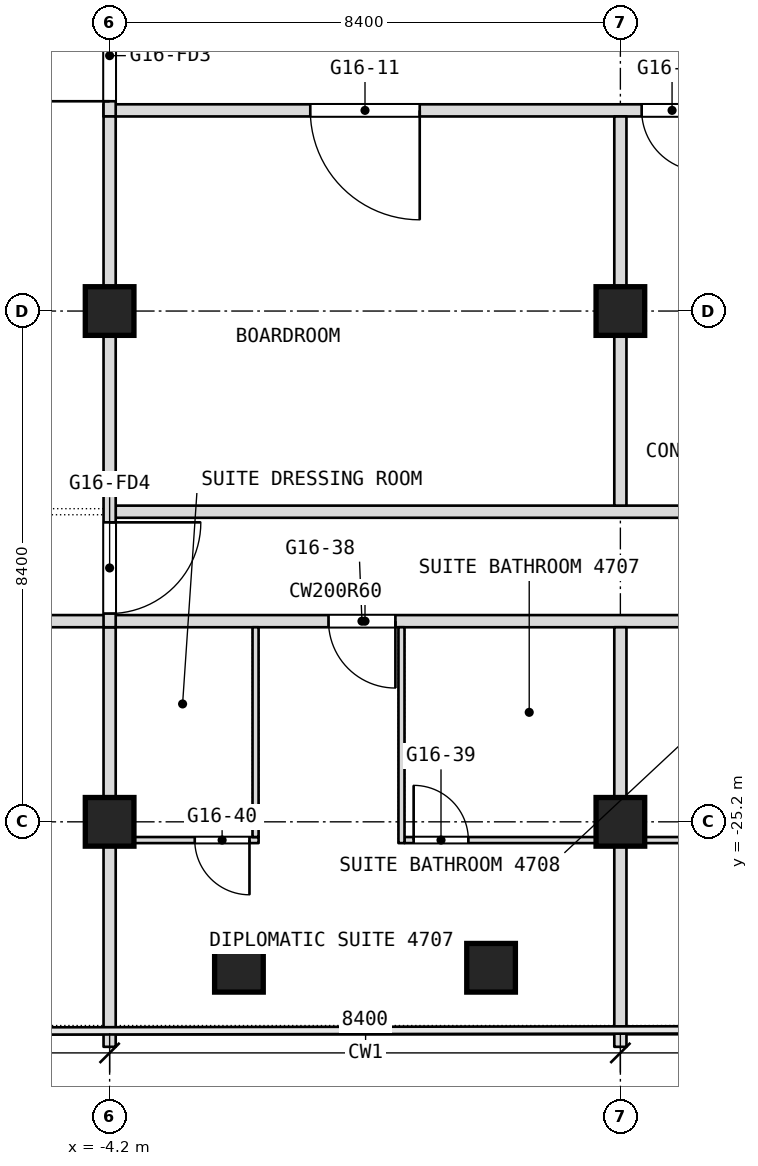
"""IFC4 building model, lengths in metres.
Left out: names, types, materials, properties, quantities, classifications, styles, units other than length and angle.
Written with IfcOpenShell. Run it as: python <this file> out.ifc"""

import sys

from ifc_helpers import new_model, si_unit, direction, frame, frame_2d, origin, origin_2d, place, context, subcontext, project, spatial, rectangle, extrude, element, fill, save


model = new_model("IFC4")
c1 = context("Model", 3, precision=1e-05, world=origin(), true_north=direction((0.0, 1.0)))
c2 = subcontext(c1, "Body", "Model", "MODEL_VIEW")
j1 = project(units=[si_unit("LENGTHUNIT", "METRE"), si_unit("PLANEANGLEUNIT", "RADIAN")], contexts=[c1])
p1 = place(None, origin())
s1 = spatial("IfcSite", under=j1, at=p1, CompositionType="ELEMENT")
p2 = place(p1, origin())
s2 = spatial("IfcBuilding", under=s1, at=p2, CompositionType="ELEMENT")
p3 = place(p2, frame((0.0, 0.0, 205.7)))
s3 = spatial("IfcBuildingStorey", under=s2, at=p3, CompositionType="ELEMENT", Elevation=205.7)
for number, where, z_axis, x_axis in (
    (1, (-4.2, -25.2, 0.0), (0.0, 0.0, 1.0), (1.0, 0.0, 0.0)),
    (2, (-4.2, -16.8, 0.0), (0.0, 0.0, 1.0), (1.0, 0.0, 0.0)),
    (3, (4.2, -25.2, 0.0), (0.0, 0.0, 1.0), (1.0, 0.0, 0.0)),
    (4, (4.2, -16.8, 0.0), (0.0, 0.0, 1.0), (1.0, 0.0, 0.0)),
    (5, (2.073, -27.6, 0.0), (0.0, 0.0, 1.0), (1.0, 0.0, 0.0)),
    (6, (-2.073, -27.6, 0.0), (0.0, 0.0, 1.0), (1.0, 0.0, 0.0)),
):
    element("IfcColumn", number, at=place(p3, frame(where, z_axis=z_axis, x_axis=x_axis)), inside=s3, PredefinedType="COLUMN", context=c2, shape_type="SweptSolid", body=[
        extrude(rectangle(XDim=0.8, YDim=0.8, at=origin_2d()), origin(), (0.0, 0.0, 1.0), 3.6),
    ])
p4 = place(p3, frame((-4.1, -25.5, 0.0), z_axis=(0.0, 0.0, 1.0), x_axis=(1.0, 0.0, 0.0)))
e7 = element("IfcWall", 7, at=p4, inside=s3, PredefinedType="PARTITIONING", context=c2, shape_type="SweptSolid", body=[
    extrude(rectangle(XDim=2.35, YDim=0.1, at=frame_2d((1.175, 0.0))), origin(), (0.0, 0.0, 1.0), 3.34),
])
p5 = place(p4, frame((1.3, 0.0, 0.0)))
e8 = element("IfcOpeningElement", 8, at=p5, cuts=e7, PredefinedType="OPENING", context=c2, shape_type="SweptSolid", body=[
    extrude(rectangle(XDim=0.9, YDim=2.1, at=frame_2d((0.45, 1.05))), frame((0.0, 0.05, 0.0), z_axis=(0.0, -1.0, 0.0), x_axis=(1.0, 0.0, 0.0)), (0.0, 0.0, 1.0), 0.1),
])
p6 = place(p3, frame((0.65, -25.5, 0.0), z_axis=(0.0, 0.0, 1.0), x_axis=(1.0, 0.0, 0.0)))
e9 = element("IfcWall", 9, at=p6, inside=s3, PredefinedType="PARTITIONING", context=c2, shape_type="SweptSolid", body=[
    extrude(rectangle(XDim=7.2, YDim=0.1, at=frame_2d((3.6, 0.0))), origin(), (0.0, 0.0, 1.0), 3.34),
])
p7 = place(p6, frame((0.15, 0.0, 0.0)))
e10 = element("IfcOpeningElement", 10, at=p7, cuts=e9, PredefinedType="OPENING", context=c2, shape_type="SweptSolid", body=[
    extrude(rectangle(XDim=0.9, YDim=2.1, at=frame_2d((0.45, 1.05))), frame((0.0, 0.05, 0.0), z_axis=(0.0, -1.0, 0.0), x_axis=(1.0, 0.0, 0.0)), (0.0, 0.0, 1.0), 0.1),
])
p8 = place(p6, frame((6.15, 0.0, 0.0)))
e11 = element("IfcOpeningElement", 11, at=p8, cuts=e9, PredefinedType="OPENING", context=c2, shape_type="SweptSolid", body=[
    extrude(rectangle(XDim=0.9, YDim=2.1, at=frame_2d((0.45, 1.05))), frame((0.0, 0.05, 0.0), z_axis=(0.0, -1.0, 0.0), x_axis=(1.0, 0.0, 0.0)), (0.0, 0.0, 1.0), 0.1),
])
p9 = place(p3, frame((-16.7, -21.9, 0.0), z_axis=(0.0, 0.0, 1.0), x_axis=(1.0, 0.0, 0.0)))
e12 = element("IfcWall", 12, at=p9, inside=s3, PredefinedType="PARTITIONING", context=c2, shape_type="SweptSolid", body=[
    extrude(rectangle(XDim=33.4, YDim=0.2, at=frame_2d((16.7, 0.0))), origin(), (0.0, 0.0, 1.0), 3.34),
])
p10 = place(p9, frame((0.3, 0.0, 0.0)))
e13 = element("IfcOpeningElement", 13, at=p10, cuts=e12, PredefinedType="OPENING", context=c2, shape_type="SweptSolid", body=[
    extrude(rectangle(XDim=1.0, YDim=2.1, at=frame_2d((0.5, 1.05))), frame((0.0, 0.1, 0.0), z_axis=(0.0, -1.0, 0.0), x_axis=(1.0, 0.0, 0.0)), (0.0, 0.0, 1.0), 0.2),
])
p11 = place(p9, frame((9.85, 0.0, 0.0)))
e14 = element("IfcOpeningElement", 14, at=p11, cuts=e12, PredefinedType="OPENING", context=c2, shape_type="SweptSolid", body=[
    extrude(rectangle(XDim=1.1, YDim=2.1, at=frame_2d((0.55, 1.05))), frame((0.0, 0.1, 0.0), z_axis=(0.0, -1.0, 0.0), x_axis=(1.0, 0.0, 0.0)), (0.0, 0.0, 1.0), 0.2),
])
p12 = place(p9, frame((16.1, 0.0, 0.0)))
e15 = element("IfcOpeningElement", 15, at=p12, cuts=e12, PredefinedType="OPENING", context=c2, shape_type="SweptSolid", body=[
    extrude(rectangle(XDim=1.1, YDim=2.1, at=frame_2d((0.55, 1.05))), frame((0.0, 0.1, 0.0), z_axis=(0.0, -1.0, 0.0), x_axis=(1.0, 0.0, 0.0)), (0.0, 0.0, 1.0), 0.2),
])
p13 = place(p9, frame((24.6, 0.0, 0.0)))
e16 = element("IfcOpeningElement", 16, at=p13, cuts=e12, PredefinedType="OPENING", context=c2, shape_type="SweptSolid", body=[
    extrude(rectangle(XDim=1.1, YDim=2.1, at=frame_2d((0.55, 1.05))), frame((0.0, 0.1, 0.0), z_axis=(0.0, -1.0, 0.0), x_axis=(1.0, 0.0, 0.0)), (0.0, 0.0, 1.0), 0.2),
])
p14 = place(p9, frame((29.7, 0.0, 0.0)))
e17 = element("IfcOpeningElement", 17, at=p14, cuts=e12, PredefinedType="OPENING", context=c2, shape_type="SweptSolid", body=[
    extrude(rectangle(XDim=1.0, YDim=2.1, at=frame_2d((0.5, 1.05))), frame((0.0, 0.1, 0.0), z_axis=(0.0, -1.0, 0.0), x_axis=(1.0, 0.0, 0.0)), (0.0, 0.0, 1.0), 0.2),
])
p15 = place(p3, frame((-4.1, -20.1, 0.0), z_axis=(0.0, 0.0, 1.0), x_axis=(1.0, 0.0, 0.0)))
e18 = element("IfcWall", 18, at=p15, inside=s3, PredefinedType="PARTITIONING", context=c2, shape_type="SweptSolid", body=[
    extrude(rectangle(XDim=20.8, YDim=0.2, at=frame_2d((10.4, 0.0))), origin(), (0.0, 0.0, 1.0), 3.34),
])
p16 = place(p3, frame((-4.3, -13.5, 0.0), z_axis=(0.0, 0.0, 1.0), x_axis=(1.0, 0.0, 0.0)))
e19 = element("IfcWall", 19, at=p16, inside=s3, PredefinedType="PARTITIONING", context=c2, shape_type="SweptSolid", body=[
    extrude(rectangle(XDim=10.0, YDim=0.2, at=frame_2d((5.0, 0.0))), origin(), (0.0, 0.0, 1.0), 3.34),
])
p17 = place(p16, frame((3.4, 0.0, 0.0)))
e20 = element("IfcOpeningElement", 20, at=p17, cuts=e19, PredefinedType="OPENING", context=c2, shape_type="SweptSolid", body=[
    extrude(rectangle(XDim=1.8, YDim=2.1, at=frame_2d((0.9, 1.05))), frame((0.0, 0.1, 0.0), z_axis=(0.0, -1.0, 0.0), x_axis=(1.0, 0.0, 0.0)), (0.0, 0.0, 1.0), 0.2),
])
p18 = place(p16, frame((8.85, 0.0, 0.0)))
e21 = element("IfcOpeningElement", 21, at=p18, cuts=e19, PredefinedType="OPENING", context=c2, shape_type="SweptSolid", body=[
    extrude(rectangle(XDim=1.0, YDim=2.1, at=frame_2d((0.5, 1.05))), frame((0.0, 0.1, 0.0), z_axis=(0.0, -1.0, 0.0), x_axis=(1.0, 0.0, 0.0)), (0.0, 0.0, 1.0), 0.2),
])
p19 = place(p3, frame((4.2, -28.9, 0.0), z_axis=(0.0, 0.0, 1.0), x_axis=(0.0, 1.0, 0.0)))
e22 = element("IfcWall", 22, at=p19, inside=s3, PredefinedType="PARTITIONING", context=c2, shape_type="SweptSolid", body=[
    extrude(rectangle(XDim=6.9, YDim=0.2, at=frame_2d((3.45, 0.0))), origin(), (0.0, 0.0, 1.0), 3.34),
])
p20 = place(p3, frame((4.2, -20.0, 0.0), z_axis=(0.0, 0.0, 1.0), x_axis=(0.0, 1.0, 0.0)))
e23 = element("IfcWall", 23, at=p20, inside=s3, PredefinedType="PARTITIONING", context=c2, shape_type="SweptSolid", body=[
    extrude(rectangle(XDim=6.4, YDim=0.2, at=frame_2d((3.2, 0.0))), origin(), (0.0, 0.0, 1.0), 3.34),
])
p21 = place(p3, frame((0.6, -25.55, 0.0), z_axis=(0.0, 0.0, 1.0), x_axis=(0.0, 1.0, 0.0)))
e24 = element("IfcWall", 24, at=p21, inside=s3, PredefinedType="PARTITIONING", context=c2, shape_type="SweptSolid", body=[
    extrude(rectangle(XDim=3.55, YDim=0.1, at=frame_2d((1.775, 0.0))), origin(), (0.0, 0.0, 1.0), 3.34),
])
p22 = place(p3, frame((-1.8, -25.45, 0.0), z_axis=(0.0, 0.0, 1.0), x_axis=(0.0, 1.0, 0.0)))
e25 = element("IfcWall", 25, at=p22, inside=s3, PredefinedType="PARTITIONING", context=c2, shape_type="SweptSolid", body=[
    extrude(rectangle(XDim=3.45, YDim=0.1, at=frame_2d((1.725, 0.0))), origin(), (0.0, 0.0, 1.0), 3.34),
])
p23 = place(p3, frame((-4.2, -28.9, 0.0), z_axis=(0.0, 0.0, 1.0), x_axis=(0.0, 1.0, 0.0)))
e26 = element("IfcWall", 26, at=p23, inside=s3, PredefinedType="PARTITIONING", context=c2, shape_type="SweptSolid", body=[
    extrude(rectangle(XDim=6.9, YDim=0.2, at=frame_2d((3.45, 0.0))), origin(), (0.0, 0.0, 1.0), 3.34),
])
p24 = place(p3, frame((-4.2, -13.6, 0.0), z_axis=(0.0, 0.0, 1.0), x_axis=(0.0, 1.0, 0.0)))
e27 = element("IfcWall", 27, at=p24, inside=s3, PredefinedType="PARTITIONING", context=c2, shape_type="SweptSolid", body=[
    extrude(rectangle(XDim=13.6, YDim=0.2, at=frame_2d((6.8, 0.0))), origin(), (0.0, 0.0, 1.0), 3.34),
])
p25 = place(p24, frame((11.95, 0.0, 0.0)))
e28 = element("IfcOpeningElement", 28, at=p25, cuts=e27, PredefinedType="OPENING", context=c2, shape_type="SweptSolid", body=[
    extrude(rectangle(XDim=1.5, YDim=2.1, at=frame_2d((0.75, 1.05))), frame((0.0, 0.1, 0.0), z_axis=(0.0, -1.0, 0.0), x_axis=(1.0, 0.0, 0.0)), (0.0, 0.0, 1.0), 0.2),
])
p26 = place(p24, frame((0.25, 0.0, 0.0)))
e29 = element("IfcOpeningElement", 29, at=p26, cuts=e27, PredefinedType="OPENING", context=c2, shape_type="SweptSolid", body=[
    extrude(rectangle(XDim=1.5, YDim=2.1, at=frame_2d((0.75, 1.05))), frame((0.0, 0.1, 0.0), z_axis=(0.0, -1.0, 0.0), x_axis=(1.0, 0.0, 0.0)), (0.0, 0.0, 1.0), 0.2),
])
p27 = place(p3, frame((-4.2, -22.0, 0.0), z_axis=(0.0, 0.0, 1.0), x_axis=(0.0, 1.0, 0.0)))
e30 = element("IfcWall", 30, at=p27, inside=s3, PredefinedType="PARTITIONING", context=c2, shape_type="SweptSolid", body=[
    extrude(rectangle(XDim=8.4, YDim=0.2, at=frame_2d((4.2, 0.0))), origin(), (0.0, 0.0, 1.0), 3.34),
])
p28 = place(p27, frame((0.225, 0.0, 0.0)))
e31 = element("IfcOpeningElement", 31, at=p28, cuts=e30, PredefinedType="OPENING", context=c2, shape_type="SweptSolid", body=[
    extrude(rectangle(XDim=1.5, YDim=2.1, at=frame_2d((0.75, 1.05))), frame((0.0, 0.1, 0.0), z_axis=(0.0, -1.0, 0.0), x_axis=(1.0, 0.0, 0.0)), (0.0, 0.0, 1.0), 0.2),
])
p29 = place(p5, origin())
e32 = element("IfcDoor", 32, at=p29, inside=s3, OperationType="SINGLE_SWING_RIGHT", PredefinedType="DOOR", context=c2, shape_type="SweptSolid", body=[
    extrude(rectangle(XDim=0.9, YDim=2.1, at=frame_2d((0.45, 1.05))), frame((0.0, 0.025, 0.0), z_axis=(0.0, -1.0, 0.0), x_axis=(1.0, 0.0, 0.0)), (0.0, 0.0, 1.0), 0.05),
])
fill(e8, e32)
p30 = place(p7, origin())
e33 = element("IfcDoor", 33, at=p30, inside=s3, OperationType="SINGLE_SWING_LEFT", PredefinedType="DOOR", context=c2, shape_type="SweptSolid", body=[
    extrude(rectangle(XDim=0.9, YDim=2.1, at=frame_2d((0.45, 1.05))), frame((0.0, 0.025, 0.0), z_axis=(0.0, -1.0, 0.0), x_axis=(1.0, 0.0, 0.0)), (0.0, 0.0, 1.0), 0.05),
])
fill(e10, e33)
p31 = place(p12, origin())
e34 = element("IfcDoor", 34, at=p31, inside=s3, OperationType="SINGLE_SWING_LEFT", PredefinedType="DOOR", context=c2, shape_type="SweptSolid", body=[
    extrude(rectangle(XDim=1.1, YDim=2.1, at=frame_2d((0.55, 1.05))), frame((0.0, 0.025, 0.0), z_axis=(0.0, -1.0, 0.0), x_axis=(1.0, 0.0, 0.0)), (0.0, 0.0, 1.0), 0.05),
])
fill(e15, e34)
p32 = place(p17, origin())
e35 = element("IfcDoor", 35, at=p32, inside=s3, OperationType="DOUBLE_DOOR_SINGLE_SWING", PredefinedType="DOOR", context=c2, shape_type="SweptSolid", body=[
    extrude(rectangle(XDim=1.8, YDim=2.1, at=frame_2d((0.9, 1.05))), frame((0.0, 0.025, 0.0), z_axis=(0.0, -1.0, 0.0), x_axis=(1.0, 0.0, 0.0)), (0.0, 0.0, 1.0), 0.05),
])
fill(e20, e35)
p33 = place(p18, origin())
e36 = element("IfcDoor", 36, at=p33, inside=s3, OperationType="SINGLE_SWING_LEFT", PredefinedType="DOOR", context=c2, shape_type="SweptSolid", body=[
    extrude(rectangle(XDim=1.0, YDim=2.1, at=frame_2d((0.5, 1.05))), frame((0.0, 0.025, 0.0), z_axis=(0.0, -1.0, 0.0), x_axis=(1.0, 0.0, 0.0)), (0.0, 0.0, 1.0), 0.05),
])
fill(e21, e36)
p34 = place(p26, origin())
e37 = element("IfcDoor", 37, at=p34, inside=s3, OperationType="DOUBLE_DOOR_DOUBLE_SWING", PredefinedType="DOOR", context=c2, shape_type="SweptSolid", body=[
    extrude(rectangle(XDim=1.5, YDim=2.1, at=frame_2d((0.75, 1.05))), frame((0.0, 0.025, 0.0), z_axis=(0.0, -1.0, 0.0), x_axis=(1.0, 0.0, 0.0)), (0.0, 0.0, 1.0), 0.05),
])
fill(e29, e37)
p35 = place(p28, origin())
e38 = element("IfcDoor", 38, at=p35, inside=s3, OperationType="DOUBLE_DOOR_DOUBLE_SWING", PredefinedType="DOOR", context=c2, shape_type="SweptSolid", body=[
    extrude(rectangle(XDim=1.5, YDim=2.1, at=frame_2d((0.75, 1.05))), frame((0.0, 0.025, 0.0), z_axis=(0.0, -1.0, 0.0), x_axis=(1.0, 0.0, 0.0)), (0.0, 0.0, 1.0), 0.05),
])
fill(e31, e38)
save(model, sys.argv[1])
